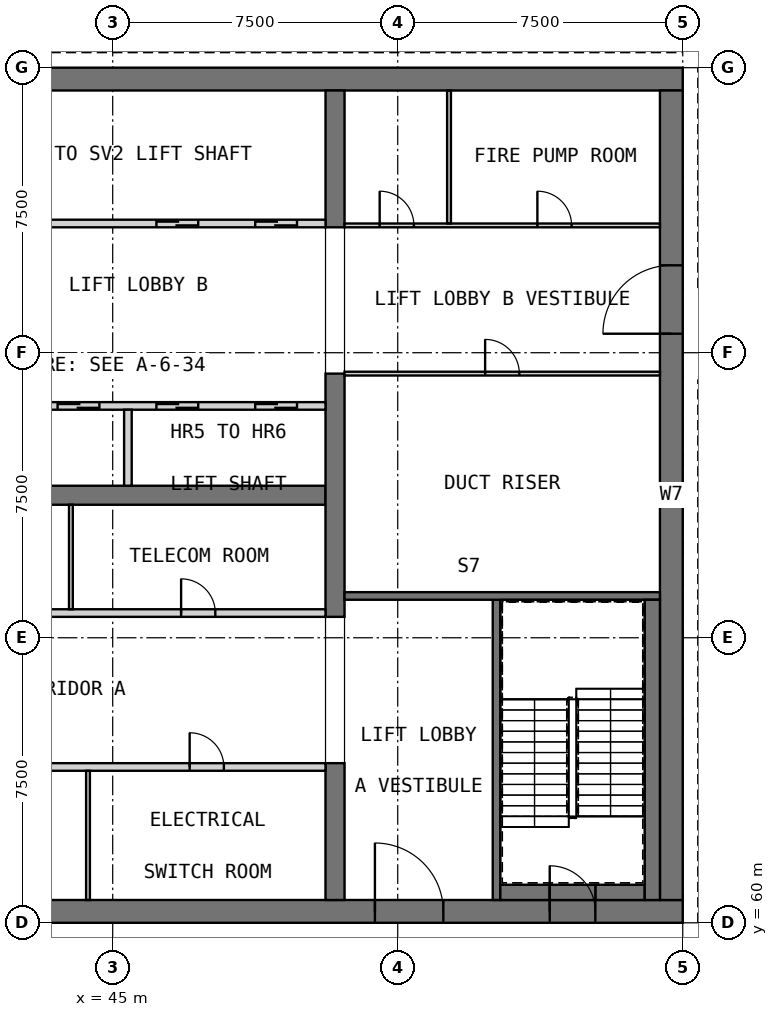
"""IFC4 building model, lengths in metres.
Left out: names, types, materials, properties, quantities, classifications, styles, units other than length and angle.
Written with IfcOpenShell. Run it as: python <this file> out.ifc"""

import sys

from ifc_helpers import new_model, si_unit, direction, frame, frame_2d, origin, place, context, subcontext, project, spatial, rectangle, extrude, element, fill, save


model = new_model("IFC4")
c1 = context("Model", 3, precision=1e-05, world=origin(), true_north=direction((0.0, 1.0)))
c2 = subcontext(c1, "Body", "Model", "MODEL_VIEW")
j1 = project(units=[si_unit("LENGTHUNIT", "METRE"), si_unit("PLANEANGLEUNIT", "RADIAN")], contexts=[c1])
p1 = place(None, origin())
s1 = spatial("IfcSite", under=j1, at=p1, CompositionType="ELEMENT")
p2 = place(p1, origin())
s2 = spatial("IfcBuilding", under=s1, at=p2, CompositionType="ELEMENT")
p3 = place(p2, frame((0.0, 0.0, 258.2)))
s3 = spatial("IfcBuildingStorey", under=s2, at=p3, CompositionType="ELEMENT", Elevation=258.2)
p4 = place(p3, frame((30.0, 60.3, 0.0), z_axis=(0.0, 0.0, 1.0), x_axis=(1.0, 0.0, 0.0)))
e1 = element("IfcWall", 1, at=p4, inside=s3, PredefinedType="SHEAR", context=c2, shape_type="SweptSolid", body=[
    extrude(rectangle(XDim=30.0, YDim=0.6, at=frame_2d((15.0, 0.0))), origin(), (0.0, 0.0, 1.0), 8.0),
])
p5 = place(p4, frame((21.9, 0.0, 0.0)))
e2 = element("IfcOpeningElement", 2, at=p5, cuts=e1, PredefinedType="OPENING", context=c2, shape_type="SweptSolid", body=[
    extrude(rectangle(XDim=1.8, YDim=2.1, at=frame_2d((0.9, 1.05))), frame((0.0, 0.31, 0.0), z_axis=(0.0, -1.0, 0.0), x_axis=(1.0, 0.0, 0.0)), (0.0, 0.0, 1.0), 0.62),
])
p6 = place(p4, frame((26.5, 0.0, 0.0)))
e3 = element("IfcOpeningElement", 3, at=p6, cuts=e1, PredefinedType="OPENING", context=c2, shape_type="SweptSolid", body=[
    extrude(rectangle(XDim=1.2, YDim=2.1, at=frame_2d((0.6, 1.05))), frame((0.0, 0.31, 0.0), z_axis=(0.0, -1.0, 0.0), x_axis=(1.0, 0.0, 0.0)), (0.0, 0.0, 1.0), 0.62),
])
p7 = place(p3, frame((30.0, 82.2, 0.0), z_axis=(0.0, 0.0, 1.0), x_axis=(1.0, 0.0, 0.0)))
e4 = element("IfcWall", 4, at=p7, inside=s3, PredefinedType="SHEAR", context=c2, shape_type="SweptSolid", body=[
    extrude(rectangle(XDim=30.0, YDim=0.6, at=frame_2d((15.0, 0.0))), origin(), (0.0, 0.0, 1.0), 8.0),
])
p8 = place(p3, frame((59.7, 60.6, 0.0), z_axis=(0.0, 0.0, 1.0), x_axis=(0.0, 1.0, 0.0)))
e5 = element("IfcWall", 5, at=p8, inside=s3, PredefinedType="SHEAR", context=c2, shape_type="SweptSolid", body=[
    extrude(rectangle(XDim=21.3, YDim=0.6, at=frame_2d((10.65, 0.0))), origin(), (0.0, 0.0, 1.0), 8.0),
])
p9 = place(p8, frame((14.9, 0.0, 0.0)))
e6 = element("IfcOpeningElement", 6, at=p9, cuts=e5, PredefinedType="OPENING", context=c2, shape_type="SweptSolid", body=[
    extrude(rectangle(XDim=1.8, YDim=2.1, at=frame_2d((0.9, 1.05))), frame((0.0, 0.31, 0.0), z_axis=(0.0, -1.0, 0.0), x_axis=(1.0, 0.0, 0.0)), (0.0, 0.0, 1.0), 0.62),
])
p10 = place(p3, frame((35.0, 71.25, 0.0), z_axis=(0.0, 0.0, 1.0), x_axis=(1.0, 0.0, 0.0)))
e7 = element("IfcWall", 7, at=p10, inside=s3, PredefinedType="SHEAR", context=c2, shape_type="SweptSolid", body=[
    extrude(rectangle(XDim=15.6, YDim=0.5, at=frame_2d((7.8, 0.0))), origin(), (0.0, 0.0, 1.0), 8.0),
])
p11 = place(p3, frame((50.85, 60.6, 0.0), z_axis=(0.0, 0.0, 1.0), x_axis=(0.0, 1.0, 0.0)))
e8 = element("IfcWall", 8, at=p11, inside=s3, PredefinedType="SHEAR", context=c2, shape_type="SweptSolid", body=[
    extrude(rectangle(XDim=3.6, YDim=0.5, at=frame_2d((1.8, 0.0))), origin(), (0.0, 0.0, 1.0), 8.0),
])
p12 = place(p3, frame((50.85, 68.05, 0.0), z_axis=(0.0, 0.0, 1.0), x_axis=(0.0, 1.0, 0.0)))
e9 = element("IfcWall", 9, at=p12, inside=s3, PredefinedType="SHEAR", context=c2, shape_type="SweptSolid", body=[
    extrude(rectangle(XDim=6.4, YDim=0.5, at=frame_2d((3.2, 0.0))), origin(), (0.0, 0.0, 1.0), 8.0),
])
p13 = place(p3, frame((50.85, 78.3, 0.0), z_axis=(0.0, 0.0, 1.0), x_axis=(0.0, 1.0, 0.0)))
e10 = element("IfcWall", 10, at=p13, inside=s3, PredefinedType="SHEAR", context=c2, shape_type="SweptSolid", body=[
    extrude(rectangle(XDim=3.6, YDim=0.5, at=frame_2d((1.8, 0.0))), origin(), (0.0, 0.0, 1.0), 8.0),
])
p14 = place(p3, frame((35.0, 64.1, 0.0), z_axis=(0.0, 0.0, 1.0), x_axis=(1.0, 0.0, 0.0)))
e11 = element("IfcWall", 11, at=p14, inside=s3, PredefinedType="PARTITIONING", context=c2, shape_type="SweptSolid", body=[
    extrude(rectangle(XDim=15.6, YDim=0.2, at=frame_2d((7.8, 0.0))), origin(), (0.0, 0.0, 1.0), 7.75),
])
p15 = place(p14, frame((4.225, 0.0, 0.0)))
e12 = element("IfcOpeningElement", 12, at=p15, cuts=e11, PredefinedType="OPENING", context=c2, shape_type="SweptSolid", body=[
    extrude(rectangle(XDim=0.9, YDim=2.1, at=frame_2d((0.45, 1.05))), frame((0.0, 0.11, 0.0), z_axis=(0.0, -1.0, 0.0), x_axis=(1.0, 0.0, 0.0)), (0.0, 0.0, 1.0), 0.22),
])
p16 = place(p14, frame((12.025, 0.0, 0.0)))
e13 = element("IfcOpeningElement", 13, at=p16, cuts=e11, PredefinedType="OPENING", context=c2, shape_type="SweptSolid", body=[
    extrude(rectangle(XDim=0.9, YDim=2.1, at=frame_2d((0.45, 1.05))), frame((0.0, 0.11, 0.0), z_axis=(0.0, -1.0, 0.0), x_axis=(1.0, 0.0, 0.0)), (0.0, 0.0, 1.0), 0.22),
])
p17 = place(p3, frame((44.35, 60.6, 0.0), z_axis=(0.0, 0.0, 1.0), x_axis=(0.0, 1.0, 0.0)))
e14 = element("IfcWall", 14, at=p17, inside=s3, PredefinedType="PARTITIONING", context=c2, shape_type="SweptSolid", body=[
    extrude(rectangle(XDim=3.4, YDim=0.1, at=frame_2d((1.7, 0.0))), origin(), (0.0, 0.0, 1.0), 7.75),
])
p18 = place(p3, frame((35.0, 68.15, 0.0), z_axis=(0.0, 0.0, 1.0), x_axis=(1.0, 0.0, 0.0)))
e15 = element("IfcWall", 15, at=p18, inside=s3, PredefinedType="PARTITIONING", context=c2, shape_type="SweptSolid", body=[
    extrude(rectangle(XDim=15.6, YDim=0.2, at=frame_2d((7.8, 0.0))), origin(), (0.0, 0.0, 1.0), 7.75),
])
p19 = place(p18, frame((4.0, 0.0, 0.0)))
e16 = element("IfcOpeningElement", 16, at=p19, cuts=e15, PredefinedType="OPENING", context=c2, shape_type="SweptSolid", body=[
    extrude(rectangle(XDim=0.9, YDim=2.1, at=frame_2d((0.45, 1.05))), frame((0.0, 0.11, 0.0), z_axis=(0.0, -1.0, 0.0), x_axis=(1.0, 0.0, 0.0)), (0.0, 0.0, 1.0), 0.22),
])
p20 = place(p18, frame((11.8, 0.0, 0.0)))
e17 = element("IfcOpeningElement", 17, at=p20, cuts=e15, PredefinedType="OPENING", context=c2, shape_type="SweptSolid", body=[
    extrude(rectangle(XDim=0.9, YDim=2.1, at=frame_2d((0.45, 1.05))), frame((0.0, 0.11, 0.0), z_axis=(0.0, -1.0, 0.0), x_axis=(1.0, 0.0, 0.0)), (0.0, 0.0, 1.0), 0.22),
])
p21 = place(p3, frame((43.9, 68.25, 0.0), z_axis=(0.0, 0.0, 1.0), x_axis=(0.0, 1.0, 0.0)))
e18 = element("IfcWall", 18, at=p21, inside=s3, PredefinedType="PARTITIONING", context=c2, shape_type="SweptSolid", body=[
    extrude(rectangle(XDim=2.75, YDim=0.1, at=frame_2d((1.375, 0.0))), origin(), (0.0, 0.0, 1.0), 7.75),
])
p22 = place(p3, frame((35.0, 73.6, 0.0), z_axis=(0.0, 0.0, 1.0), x_axis=(1.0, 0.0, 0.0)))
e19 = element("IfcWall", 19, at=p22, inside=s3, PredefinedType="SOLIDWALL", context=c2, shape_type="SweptSolid", body=[
    extrude(rectangle(XDim=15.6, YDim=0.2, at=frame_2d((7.8, 0.0))), origin(), (0.0, 0.0, 1.0), 8.0),
])
p23 = place(p22, frame((0.75, 0.0, 0.0)))
e20 = element("IfcOpeningElement", 20, at=p23, cuts=e19, PredefinedType="OPENING", context=c2, shape_type="SweptSolid", body=[
    extrude(rectangle(XDim=1.1, YDim=2.1, at=frame_2d((0.55, 1.05))), frame((0.0, 0.11, 0.0), z_axis=(0.0, -1.0, 0.0), x_axis=(1.0, 0.0, 0.0)), (0.0, 0.0, 1.0), 0.22),
])
p24 = place(p22, frame((3.35, 0.0, 0.0)))
e21 = element("IfcOpeningElement", 21, at=p24, cuts=e19, PredefinedType="OPENING", context=c2, shape_type="SweptSolid", body=[
    extrude(rectangle(XDim=1.1, YDim=2.1, at=frame_2d((0.55, 1.05))), frame((0.0, 0.11, 0.0), z_axis=(0.0, -1.0, 0.0), x_axis=(1.0, 0.0, 0.0)), (0.0, 0.0, 1.0), 0.22),
])
p25 = place(p22, frame((5.95, 0.0, 0.0)))
e22 = element("IfcOpeningElement", 22, at=p25, cuts=e19, PredefinedType="OPENING", context=c2, shape_type="SweptSolid", body=[
    extrude(rectangle(XDim=1.1, YDim=2.1, at=frame_2d((0.55, 1.05))), frame((0.0, 0.11, 0.0), z_axis=(0.0, -1.0, 0.0), x_axis=(1.0, 0.0, 0.0)), (0.0, 0.0, 1.0), 0.22),
])
p26 = place(p22, frame((8.55, 0.0, 0.0)))
e23 = element("IfcOpeningElement", 23, at=p26, cuts=e19, PredefinedType="OPENING", context=c2, shape_type="SweptSolid", body=[
    extrude(rectangle(XDim=1.1, YDim=2.1, at=frame_2d((0.55, 1.05))), frame((0.0, 0.11, 0.0), z_axis=(0.0, -1.0, 0.0), x_axis=(1.0, 0.0, 0.0)), (0.0, 0.0, 1.0), 0.22),
])
p27 = place(p22, frame((11.15, 0.0, 0.0)))
e24 = element("IfcOpeningElement", 24, at=p27, cuts=e19, PredefinedType="OPENING", context=c2, shape_type="SweptSolid", body=[
    extrude(rectangle(XDim=1.1, YDim=2.1, at=frame_2d((0.55, 1.05))), frame((0.0, 0.11, 0.0), z_axis=(0.0, -1.0, 0.0), x_axis=(1.0, 0.0, 0.0)), (0.0, 0.0, 1.0), 0.22),
])
p28 = place(p22, frame((13.75, 0.0, 0.0)))
e25 = element("IfcOpeningElement", 25, at=p28, cuts=e19, PredefinedType="OPENING", context=c2, shape_type="SweptSolid", body=[
    extrude(rectangle(XDim=1.1, YDim=2.1, at=frame_2d((0.55, 1.05))), frame((0.0, 0.11, 0.0), z_axis=(0.0, -1.0, 0.0), x_axis=(1.0, 0.0, 0.0)), (0.0, 0.0, 1.0), 0.22),
])
p29 = place(p3, frame((45.4, 71.5, 0.0), z_axis=(0.0, 0.0, 1.0), x_axis=(0.0, 1.0, 0.0)))
e26 = element("IfcWall", 26, at=p29, inside=s3, PredefinedType="SOLIDWALL", context=c2, shape_type="SweptSolid", body=[
    extrude(rectangle(XDim=2.0, YDim=0.2, at=frame_2d((1.0, 0.0))), origin(), (0.0, 0.0, 1.0), 8.0),
])
p30 = place(p3, frame((35.0, 78.4, 0.0), z_axis=(0.0, 0.0, 1.0), x_axis=(1.0, 0.0, 0.0)))
e27 = element("IfcWall", 27, at=p30, inside=s3, PredefinedType="SOLIDWALL", context=c2, shape_type="SweptSolid", body=[
    extrude(rectangle(XDim=15.6, YDim=0.2, at=frame_2d((7.8, 0.0))), origin(), (0.0, 0.0, 1.0), 8.0),
])
p31 = place(p30, frame((0.75, 0.0, 0.0)))
e28 = element("IfcOpeningElement", 28, at=p31, cuts=e27, PredefinedType="OPENING", context=c2, shape_type="SweptSolid", body=[
    extrude(rectangle(XDim=1.1, YDim=2.1, at=frame_2d((0.55, 1.05))), frame((0.0, 0.11, 0.0), z_axis=(0.0, -1.0, 0.0), x_axis=(1.0, 0.0, 0.0)), (0.0, 0.0, 1.0), 0.22),
])
p32 = place(p30, frame((3.35, 0.0, 0.0)))
e29 = element("IfcOpeningElement", 29, at=p32, cuts=e27, PredefinedType="OPENING", context=c2, shape_type="SweptSolid", body=[
    extrude(rectangle(XDim=1.1, YDim=2.1, at=frame_2d((0.55, 1.05))), frame((0.0, 0.11, 0.0), z_axis=(0.0, -1.0, 0.0), x_axis=(1.0, 0.0, 0.0)), (0.0, 0.0, 1.0), 0.22),
])
p33 = place(p30, frame((11.15, 0.0, 0.0)))
e30 = element("IfcOpeningElement", 30, at=p33, cuts=e27, PredefinedType="OPENING", context=c2, shape_type="SweptSolid", body=[
    extrude(rectangle(XDim=1.1, YDim=2.1, at=frame_2d((0.55, 1.05))), frame((0.0, 0.11, 0.0), z_axis=(0.0, -1.0, 0.0), x_axis=(1.0, 0.0, 0.0)), (0.0, 0.0, 1.0), 0.22),
])
p34 = place(p30, frame((13.75, 0.0, 0.0)))
e31 = element("IfcOpeningElement", 31, at=p34, cuts=e27, PredefinedType="OPENING", context=c2, shape_type="SweptSolid", body=[
    extrude(rectangle(XDim=1.1, YDim=2.1, at=frame_2d((0.55, 1.05))), frame((0.0, 0.11, 0.0), z_axis=(0.0, -1.0, 0.0), x_axis=(1.0, 0.0, 0.0)), (0.0, 0.0, 1.0), 0.22),
])
p35 = place(p3, frame((55.1, 60.6, 0.0), z_axis=(0.0, 0.0, 1.0), x_axis=(0.0, 1.0, 0.0)))
e32 = element("IfcWall", 32, at=p35, inside=s3, PredefinedType="SOLIDWALL", context=c2, shape_type="SweptSolid", body=[
    extrude(rectangle(XDim=8.0, YDim=0.2, at=frame_2d((4.0, 0.0))), origin(), (0.0, 0.0, 1.0), 7.75),
])
p36 = place(p3, frame((51.1, 68.6, 0.0), z_axis=(0.0, 0.0, 1.0), x_axis=(1.0, 0.0, 0.0)))
e33 = element("IfcWall", 33, at=p36, inside=s3, PredefinedType="SOLIDWALL", context=c2, shape_type="SweptSolid", body=[
    extrude(rectangle(XDim=8.3, YDim=0.2, at=frame_2d((4.15, 0.0))), origin(), (0.0, 0.0, 1.0), 7.75),
])
for number, where, z_axis, x_axis in (
    (34, (55.2, 60.8, 0.0), (0.0, 0.0, 1.0), (1.0, 0.0, 0.0)),
    (35, (57.7, 60.8, 0.0), (0.0, 0.0, 1.0), (1.0, 0.0, 0.0)),
):
    element("IfcWall", number, at=place(p3, frame(where, z_axis=z_axis, x_axis=x_axis)), inside=s3, PredefinedType="SOLIDWALL", context=c2, shape_type="SweptSolid", body=[
        extrude(rectangle(XDim=1.3, YDim=0.4, at=frame_2d((0.65, 0.0))), origin(), (0.0, 0.0, 1.0), 7.75),
    ])
p37 = place(p3, frame((59.2, 60.6, 0.0), z_axis=(0.0, 0.0, 1.0), x_axis=(0.0, 1.0, 0.0)))
e36 = element("IfcWall", 36, at=p37, inside=s3, PredefinedType="SOLIDWALL", context=c2, shape_type="SweptSolid", body=[
    extrude(rectangle(XDim=7.9, YDim=0.4, at=frame_2d((3.95, 0.0))), origin(), (0.0, 0.0, 1.0), 7.75),
])
p38 = place(p3, frame((56.5, 60.8, 3.2), z_axis=(0.0, 0.0, 1.0), x_axis=(1.0, 0.0, 0.0)))
e37 = element("IfcWall", 37, at=p38, inside=s3, PredefinedType="SOLIDWALL", context=c2, shape_type="SweptSolid", body=[
    extrude(rectangle(XDim=1.2, YDim=0.4, at=frame_2d((0.6, 0.0))), origin(), (0.0, 0.0, 1.0), 4.55),
])
p39 = place(p3, frame((51.1, 74.45, 0.0), z_axis=(0.0, 0.0, 1.0), x_axis=(1.0, 0.0, 0.0)))
e38 = element("IfcWall", 38, at=p39, inside=s3, PredefinedType="PARTITIONING", context=c2, shape_type="SweptSolid", body=[
    extrude(rectangle(XDim=8.3, YDim=0.1, at=frame_2d((4.15, 0.0))), origin(), (0.0, 0.0, 1.0), 7.75),
])
p40 = place(p39, frame((3.7, 0.0, 0.0)))
e39 = element("IfcOpeningElement", 39, at=p40, cuts=e38, PredefinedType="OPENING", context=c2, shape_type="SweptSolid", body=[
    extrude(rectangle(XDim=0.9, YDim=2.1, at=frame_2d((0.45, 1.05))), frame((0.0, 0.06, 0.0), z_axis=(0.0, -1.0, 0.0), x_axis=(1.0, 0.0, 0.0)), (0.0, 0.0, 1.0), 0.12),
])
p41 = place(p3, frame((51.1, 78.35, 0.0), z_axis=(0.0, 0.0, 1.0), x_axis=(1.0, 0.0, 0.0)))
e40 = element("IfcWall", 40, at=p41, inside=s3, PredefinedType="PARTITIONING", context=c2, shape_type="SweptSolid", body=[
    extrude(rectangle(XDim=8.3, YDim=0.1, at=frame_2d((4.15, 0.0))), origin(), (0.0, 0.0, 1.0), 7.75),
])
p42 = place(p41, frame((0.925, 0.0, 0.0)))
e41 = element("IfcOpeningElement", 41, at=p42, cuts=e40, PredefinedType="OPENING", context=c2, shape_type="SweptSolid", body=[
    extrude(rectangle(XDim=0.9, YDim=2.1, at=frame_2d((0.45, 1.05))), frame((0.0, 0.06, 0.0), z_axis=(0.0, -1.0, 0.0), x_axis=(1.0, 0.0, 0.0)), (0.0, 0.0, 1.0), 0.12),
])
p43 = place(p41, frame((5.075, 0.0, 0.0)))
e42 = element("IfcOpeningElement", 42, at=p43, cuts=e40, PredefinedType="OPENING", context=c2, shape_type="SweptSolid", body=[
    extrude(rectangle(XDim=0.9, YDim=2.1, at=frame_2d((0.45, 1.05))), frame((0.0, 0.06, 0.0), z_axis=(0.0, -1.0, 0.0), x_axis=(1.0, 0.0, 0.0)), (0.0, 0.0, 1.0), 0.12),
])
p44 = place(p3, frame((53.85, 78.4, 0.0), z_axis=(0.0, 0.0, 1.0), x_axis=(0.0, 1.0, 0.0)))
e43 = element("IfcWall", 43, at=p44, inside=s3, PredefinedType="PARTITIONING", context=c2, shape_type="SweptSolid", body=[
    extrude(rectangle(XDim=3.5, YDim=0.1, at=frame_2d((1.75, 0.0))), origin(), (0.0, 0.0, 1.0), 7.75),
])
p45 = place(p16, origin())
e44 = element("IfcDoor", 44, at=p45, inside=s3, OperationType="SINGLE_SWING_RIGHT", PredefinedType="DOOR", context=c2, shape_type="SweptSolid", body=[
    extrude(rectangle(XDim=0.9, YDim=2.1, at=frame_2d((0.45, 1.05))), frame((0.0, 0.025, 0.0), z_axis=(0.0, -1.0, 0.0), x_axis=(1.0, 0.0, 0.0)), (0.0, 0.0, 1.0), 0.05),
])
fill(e13, e44)
p46 = place(p20, origin())
e45 = element("IfcDoor", 45, at=p46, inside=s3, OperationType="SINGLE_SWING_RIGHT", PredefinedType="DOOR", context=c2, shape_type="SweptSolid", body=[
    extrude(rectangle(XDim=0.9, YDim=2.1, at=frame_2d((0.45, 1.05))), frame((0.0, 0.025, 0.0), z_axis=(0.0, -1.0, 0.0), x_axis=(1.0, 0.0, 0.0)), (0.0, 0.0, 1.0), 0.05),
])
fill(e17, e45)
p47 = place(p26, origin())
e46 = element("IfcDoor", 46, at=p47, inside=s3, OperationType="DOUBLE_DOOR_SLIDING", PredefinedType="DOOR", context=c2, shape_type="SweptSolid", body=[
    extrude(rectangle(XDim=1.1, YDim=2.1, at=frame_2d((0.55, 1.05))), frame((0.0, 0.025, 0.0), z_axis=(0.0, -1.0, 0.0), x_axis=(1.0, 0.0, 0.0)), (0.0, 0.0, 1.0), 0.05),
])
fill(e23, e46)
p48 = place(p27, origin())
e47 = element("IfcDoor", 47, at=p48, inside=s3, OperationType="DOUBLE_DOOR_SLIDING", PredefinedType="DOOR", context=c2, shape_type="SweptSolid", body=[
    extrude(rectangle(XDim=1.1, YDim=2.1, at=frame_2d((0.55, 1.05))), frame((0.0, 0.025, 0.0), z_axis=(0.0, -1.0, 0.0), x_axis=(1.0, 0.0, 0.0)), (0.0, 0.0, 1.0), 0.05),
])
fill(e24, e47)
p49 = place(p28, origin())
e48 = element("IfcDoor", 48, at=p49, inside=s3, OperationType="DOUBLE_DOOR_SLIDING", PredefinedType="DOOR", context=c2, shape_type="SweptSolid", body=[
    extrude(rectangle(XDim=1.1, YDim=2.1, at=frame_2d((0.55, 1.05))), frame((0.0, 0.025, 0.0), z_axis=(0.0, -1.0, 0.0), x_axis=(1.0, 0.0, 0.0)), (0.0, 0.0, 1.0), 0.05),
])
fill(e25, e48)
p50 = place(p33, origin())
e49 = element("IfcDoor", 49, at=p50, inside=s3, OperationType="DOUBLE_DOOR_SLIDING", PredefinedType="DOOR", context=c2, shape_type="SweptSolid", body=[
    extrude(rectangle(XDim=1.1, YDim=2.1, at=frame_2d((0.55, 1.05))), frame((0.0, 0.025, 0.0), z_axis=(0.0, -1.0, 0.0), x_axis=(1.0, 0.0, 0.0)), (0.0, 0.0, 1.0), 0.05),
])
fill(e30, e49)
p51 = place(p34, origin())
e50 = element("IfcDoor", 50, at=p51, inside=s3, OperationType="DOUBLE_DOOR_SLIDING", PredefinedType="DOOR", context=c2, shape_type="SweptSolid", body=[
    extrude(rectangle(XDim=1.1, YDim=2.1, at=frame_2d((0.55, 1.05))), frame((0.0, 0.025, 0.0), z_axis=(0.0, -1.0, 0.0), x_axis=(1.0, 0.0, 0.0)), (0.0, 0.0, 1.0), 0.05),
])
fill(e31, e50)
p52 = place(p5, origin())
e51 = element("IfcDoor", 51, at=p52, inside=s3, OperationType="DOUBLE_DOOR_SINGLE_SWING", PredefinedType="DOOR", context=c2, shape_type="SweptSolid", body=[
    extrude(rectangle(XDim=1.8, YDim=2.1, at=frame_2d((0.9, 1.05))), frame((0.0, 0.025, 0.0), z_axis=(0.0, -1.0, 0.0), x_axis=(1.0, 0.0, 0.0)), (0.0, 0.0, 1.0), 0.05),
])
fill(e2, e51)
p53 = place(p9, origin())
e52 = element("IfcDoor", 52, at=p53, inside=s3, OperationType="DOUBLE_DOOR_SINGLE_SWING", PredefinedType="DOOR", context=c2, shape_type="SweptSolid", body=[
    extrude(rectangle(XDim=1.8, YDim=2.1, at=frame_2d((0.9, 1.05))), frame((0.0, 0.025, 0.0), z_axis=(0.0, -1.0, 0.0), x_axis=(1.0, 0.0, 0.0)), (0.0, 0.0, 1.0), 0.05),
])
fill(e6, e52)
p54 = place(p6, origin())
e53 = element("IfcDoor", 53, at=p54, inside=s3, OperationType="SINGLE_SWING_LEFT", PredefinedType="DOOR", context=c2, shape_type="SweptSolid", body=[
    extrude(rectangle(XDim=1.2, YDim=2.1, at=frame_2d((0.6, 1.05))), frame((0.0, 0.025, 0.0), z_axis=(0.0, -1.0, 0.0), x_axis=(1.0, 0.0, 0.0)), (0.0, 0.0, 1.0), 0.05),
])
fill(e3, e53)
p55 = place(p40, origin())
e54 = element("IfcDoor", 54, at=p55, inside=s3, OperationType="SINGLE_SWING_LEFT", PredefinedType="DOOR", context=c2, shape_type="SweptSolid", body=[
    extrude(rectangle(XDim=0.9, YDim=2.1, at=frame_2d((0.45, 1.05))), frame((0.0, 0.025, 0.0), z_axis=(0.0, -1.0, 0.0), x_axis=(1.0, 0.0, 0.0)), (0.0, 0.0, 1.0), 0.05),
])
fill(e39, e54)
p56 = place(p42, origin())
e55 = element("IfcDoor", 55, at=p56, inside=s3, OperationType="SINGLE_SWING_LEFT", PredefinedType="DOOR", context=c2, shape_type="SweptSolid", body=[
    extrude(rectangle(XDim=0.9, YDim=2.1, at=frame_2d((0.45, 1.05))), frame((0.0, 0.025, 0.0), z_axis=(0.0, -1.0, 0.0), x_axis=(1.0, 0.0, 0.0)), (0.0, 0.0, 1.0), 0.05),
])
fill(e41, e55)
p57 = place(p43, origin())
e56 = element("IfcDoor", 56, at=p57, inside=s3, OperationType="SINGLE_SWING_RIGHT", PredefinedType="DOOR", context=c2, shape_type="SweptSolid", body=[
    extrude(rectangle(XDim=0.9, YDim=2.1, at=frame_2d((0.45, 1.05))), frame((0.0, 0.025, 0.0), z_axis=(0.0, -1.0, 0.0), x_axis=(1.0, 0.0, 0.0)), (0.0, 0.0, 1.0), 0.05),
])
fill(e42, e56)
save(model, sys.argv[1])
